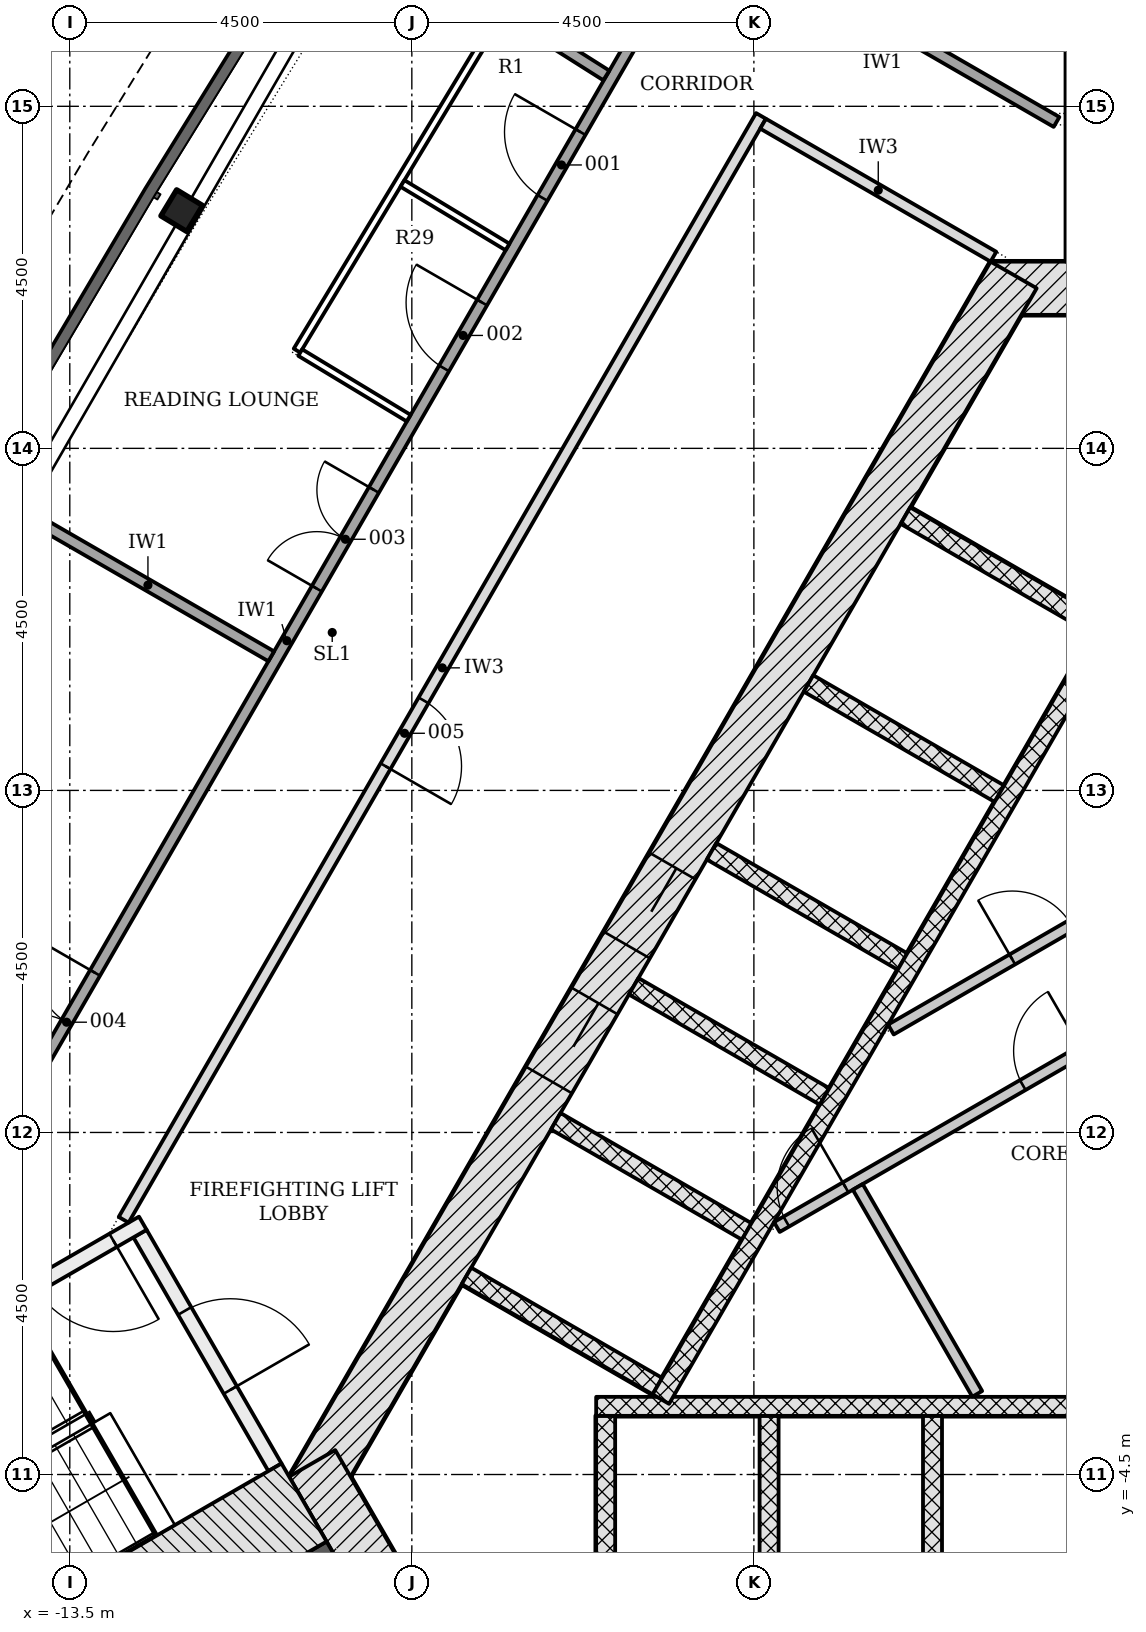
"""IFC4 building model, lengths in metres.
Left out: names, types, materials, properties, quantities, classifications, styles, units other than length and angle.
Written with IfcOpenShell. Run it as: python <this file> out.ifc"""

import sys

from ifc_helpers import new_model, si_unit, direction, frame, frame_2d, origin, origin_2d, place, context, subcontext, project, spatial, rectangle, i_section, extrude, element, fill, save


model = new_model("IFC4")
c1 = context("Model", 3, precision=1e-05, world=origin(), true_north=direction((0.0, 1.0)))
c2 = subcontext(c1, "Body", "Model", "MODEL_VIEW")
j1 = project(units=[si_unit("LENGTHUNIT", "METRE"), si_unit("PLANEANGLEUNIT", "RADIAN")], contexts=[c1])
p1 = place(None, origin())
s1 = spatial("IfcSite", under=j1, at=p1, CompositionType="ELEMENT")
p2 = place(p1, origin())
s2 = spatial("IfcBuilding", under=s1, at=p2, CompositionType="ELEMENT")
p3 = place(p2, frame((0.0, 0.0, 109.5)))
s3 = spatial("IfcBuildingStorey", under=s2, at=p3, CompositionType="ELEMENT", Elevation=109.5)
p4 = place(p3, frame((1.386, 11.106, -0.2), z_axis=(0.0, 0.0, 1.0), x_axis=(-1.0, 0.0, 0.0)))
e1 = element("IfcWall", 1, at=p4, inside=s3, PredefinedType="SHEAR", context=c2, shape_type="SweptSolid", body=[
    extrude(rectangle(XDim=2.771, YDim=0.7, at=frame_2d((1.386, 0.0))), origin(), (0.0, 0.0, 1.0), 3.6),
])
p5 = place(p3, frame((-1.083, 11.281, -0.2), z_axis=(0.0, 0.0, 1.0), x_axis=(-0.500001446645, -0.866024568562, 0.0)))
e2 = element("IfcWall", 2, at=p5, inside=s3, PredefinedType="SHEAR", context=c2, shape_type="SweptSolid", body=[
    extrude(rectangle(XDim=18.458, YDim=0.7, at=frame_2d((9.229, 0.0))), origin(), (0.0, 0.0, 1.0), 3.6),
])
p6 = place(p5, frame((8.979, 0.0, 0.2)))
e3 = element("IfcOpeningElement", 3, at=p6, cuts=e2, PredefinedType="OPENING", context=c2, shape_type="SweptSolid", body=[
    extrude(rectangle(XDim=1.2, YDim=2.1, at=frame_2d((0.6, 1.05))), frame((0.0, 0.36, 0.0), z_axis=(0.0, -1.0, 0.0), x_axis=(1.0, 0.0, 0.0)), (0.0, 0.0, 1.0), 0.72),
])
p7 = place(p5, frame((11.029, 0.0, 0.2)))
e4 = element("IfcOpeningElement", 4, at=p7, cuts=e2, PredefinedType="OPENING", context=c2, shape_type="SweptSolid", body=[
    extrude(rectangle(XDim=1.2, YDim=2.1, at=frame_2d((0.6, 1.05))), frame((0.0, 0.36, 0.0), z_axis=(0.0, -1.0, 0.0), x_axis=(1.0, 0.0, 0.0)), (0.0, 0.0, 1.0), 0.72),
])
p8 = place(p3, frame((-10.311, -4.353, -0.2), z_axis=(0.0, 0.0, 1.0), x_axis=(0.500042739161, -0.866000726912, 0.0)))
e5 = element("IfcWall", 5, at=p8, inside=s3, PredefinedType="SHEAR", context=c2, shape_type="SweptSolid", body=[
    extrude(rectangle(XDim=2.771, YDim=0.7, at=frame_2d((1.386, 0.0))), origin(), (0.0, 0.0, 1.0), 3.6),
])
p9 = place(p3, frame((0.0, 11.456, -0.2), z_axis=(0.0, 0.0, 1.0), x_axis=(0.0, 1.0, 0.0)))
e6 = element("IfcWall", 6, at=p9, inside=s3, PredefinedType="SHEAR", context=c2, shape_type="SweptSolid", body=[
    extrude(rectangle(XDim=11.919, YDim=0.8, at=frame_2d((5.959, 0.0))), origin(), (0.0, 0.0, 1.0), 3.6),
])
p10 = place(p3, frame((-9.922, -5.728, -0.2), z_axis=(0.0, 0.0, 1.0), x_axis=(-0.866027307971, -0.499996701837, 0.0)))
e7 = element("IfcWall", 7, at=p10, inside=s3, PredefinedType="SHEAR", context=c2, shape_type="SweptSolid", body=[
    extrude(rectangle(XDim=11.918, YDim=0.8, at=frame_2d((5.959, 0.0))), origin(), (0.0, 0.0, 1.0), 3.6),
])
p11 = place(p3, frame((-12.027, 12.127, -0.2), z_axis=(0.0, 0.0, 1.0), x_axis=(-0.517286763685, -0.855812131321, 0.0)))
e8 = element("IfcColumn", 8, at=p11, inside=s3, PredefinedType="COLUMN", context=c2, shape_type="SweptSolid", body=[
    extrude(i_section(OverallWidth=0.401, OverallDepth=0.399, WebThickness=0.025, FlangeThickness=0.04, FilletRadius=0.015, at=origin_2d()), origin(), (0.0, 0.0, 1.0), 3.6),
])
for number, where, z_axis, x_axis in (
    (9, (-6.45, -6.228, -0.2), (0.0, 0.0, 1.0), (0.0, 1.0, 0.0)),
    (10, (-4.3, -6.228, -0.2), (0.0, 0.0, 1.0), (0.0, 1.0, 0.0)),
    (11, (-2.15, -6.228, -0.2), (0.0, 0.0, 1.0), (0.0, 1.0, 0.0)),
):
    element("IfcWall", number, at=place(p3, frame(where, z_axis=z_axis, x_axis=x_axis)), inside=s3, PredefinedType="PARTITIONING", context=c2, shape_type="SweptSolid", body=[
        extrude(rectangle(XDim=2.5, YDim=0.25, at=frame_2d((1.25, 0.0))), origin(), (0.0, 0.0, 1.0), 3.6),
    ])
p12 = place(p3, frame((-6.575, -3.603, 0.0), z_axis=(0.0, 0.0, 1.0), x_axis=(1.0, 0.0, 0.0)))
e12 = element("IfcWall", 12, at=p12, inside=s3, PredefinedType="PARTITIONING", context=c2, shape_type="SweptSolid", body=[
    extrude(rectangle(XDim=13.15, YDim=0.25, at=frame_2d((6.575, 0.0))), origin(), (0.0, 0.0, 1.0), 3.4),
])
p13 = place(p3, frame((-2.506, 8.115, -0.2), z_axis=(0.0, 0.0, 1.0), x_axis=(0.865996321171, -0.50005036918, 0.0)))
e13 = element("IfcWall", 13, at=p13, inside=s3, PredefinedType="PARTITIONING", context=c2, shape_type="SweptSolid", body=[
    extrude(rectangle(XDim=2.9, YDim=0.25, at=frame_2d((1.45, 0.0))), origin(), (0.0, 0.0, 1.0), 3.6),
])
for number, where, z_axis, x_axis in (
    (14, (-3.781, 5.907, -0.2), (0.0, 0.0, 1.0), (0.866, -0.5, 0.0)),
    (15, (-5.056, 3.699, -0.2), (0.0, 0.0, 1.0), (0.866, -0.5, 0.0)),
    (16, (-6.081, 1.923, -0.2), (0.0, 0.0, 1.0), (0.866, -0.5, 0.0)),
    (17, (-7.106, 0.148, -0.2), (0.0, 0.0, 1.0), (0.866, -0.5, 0.0)),
    (18, (-8.281, -1.887, -0.2), (0.0, 0.0, 1.0), (0.866, -0.5, 0.0)),
):
    element("IfcWall", number, at=place(p3, frame(where, z_axis=z_axis, x_axis=x_axis)), inside=s3, PredefinedType="PARTITIONING", context=c2, shape_type="SweptSolid", body=[
        extrude(rectangle(XDim=2.9, YDim=0.25, at=frame_2d((1.45, 0.0))), origin(), (0.0, 0.0, 1.0), 3.6),
    ])
p14 = place(p3, frame((0.176, 6.711, 0.0), z_axis=(0.0, 0.0, 1.0), x_axis=(-0.500004227369, -0.866022963098, 0.0)))
e19 = element("IfcWall", 19, at=p14, inside=s3, PredefinedType="PARTITIONING", context=c2, shape_type="SweptSolid", body=[
    extrude(rectangle(XDim=11.8, YDim=0.25, at=frame_2d((5.9, 0.0))), origin(), (0.0, 0.0, 1.0), 3.4),
])
p15 = place(p3, frame((-4.198, -1.244, 0.0), z_axis=(0.0, 0.0, 1.0), x_axis=(0.866020798945, 0.500007975732, 0.0)))
e20 = element("IfcWall", 20, at=p15, inside=s3, PredefinedType="PARTITIONING", context=c2, shape_type="SweptSolid", body=[
    extrude(rectangle(XDim=10.486, YDim=0.15, at=frame_2d((5.243, 0.0))), origin(), (0.0, 0.0, 1.0), 3.4),
])
p16 = place(p15, frame((3.736, 0.0, 0.0)))
e21 = element("IfcOpeningElement", 21, at=p16, cuts=e20, PredefinedType="OPENING", context=c2, shape_type="SweptSolid", body=[
    extrude(rectangle(XDim=0.9, YDim=2.1, at=frame_2d((0.45, 1.05))), frame((0.0, 0.085, 0.0), z_axis=(0.0, -1.0, 0.0), x_axis=(1.0, 0.0, 0.0)), (0.0, 0.0, 1.0), 0.17),
])
p17 = place(p15, frame((0.144, 0.0, 0.0)))
e22 = element("IfcOpeningElement", 22, at=p17, cuts=e20, PredefinedType="OPENING", context=c2, shape_type="SweptSolid", body=[
    extrude(rectangle(XDim=0.9, YDim=2.1, at=frame_2d((0.45, 1.05))), frame((0.0, 0.085, 0.0), z_axis=(0.0, -1.0, 0.0), x_axis=(1.0, 0.0, 0.0)), (0.0, 0.0, 1.0), 0.17),
])
p18 = place(p3, frame((-1.561, -3.439, 0.0), z_axis=(0.0, 0.0, 1.0), x_axis=(-0.499989077369, 0.866031709877, 0.0)))
e23 = element("IfcWall", 23, at=p18, inside=s3, PredefinedType="PARTITIONING", context=c2, shape_type="SweptSolid", body=[
    extrude(rectangle(XDim=3.144, YDim=0.15, at=frame_2d((1.572, 0.0))), origin(), (0.0, 0.0, 1.0), 3.4),
])
p19 = place(p3, frame((-2.698, 1.354, 0.0), z_axis=(0.0, 0.0, 1.0), x_axis=(0.866021157486, 0.500007354732, 0.0)))
e24 = element("IfcWall", 24, at=p19, inside=s3, PredefinedType="PARTITIONING", context=c2, shape_type="SweptSolid", body=[
    extrude(rectangle(XDim=7.888, YDim=0.15, at=frame_2d((3.944, 0.0))), origin(), (0.0, 0.0, 1.0), 3.4),
])
p20 = place(p19, frame((1.845, 0.0, 0.0)))
e25 = element("IfcOpeningElement", 25, at=p20, cuts=e24, PredefinedType="OPENING", context=c2, shape_type="SweptSolid", body=[
    extrude(rectangle(XDim=0.9, YDim=2.1, at=frame_2d((0.45, 1.05))), frame((0.0, 0.085, 0.0), z_axis=(0.0, -1.0, 0.0), x_axis=(1.0, 0.0, 0.0)), (0.0, 0.0, 1.0), 0.17),
])
p21 = place(p3, frame((-12.576, -1.331, -0.2), z_axis=(0.0, 0.0, 1.0), x_axis=(0.499970499736, -0.8660424351, 0.0)))
e26 = element("IfcWall", 26, at=p21, inside=s3, PredefinedType="SHEAR", context=c2, shape_type="SweptSolid", body=[
    extrude(rectangle(XDim=3.55, YDim=0.2, at=frame_2d((1.775, 0.0))), origin(), (0.0, 0.0, 1.0), 3.6),
])
p22 = place(p21, frame((1.175, 0.0, 0.2)))
e27 = element("IfcOpeningElement", 27, at=p22, cuts=e26, PredefinedType="OPENING", context=c2, shape_type="SweptSolid", body=[
    extrude(rectangle(XDim=1.2, YDim=2.1, at=frame_2d((0.6, 1.05))), frame((0.0, 0.11, 0.0), z_axis=(0.0, -1.0, 0.0), x_axis=(1.0, 0.0, 0.0)), (0.0, 0.0, 1.0), 0.22),
])
p23 = place(p3, frame((-12.539, -1.194, -0.2), z_axis=(0.0, 0.0, 1.0), x_axis=(-0.866045472092, -0.499965239061, 0.0)))
e28 = element("IfcWall", 28, at=p23, inside=s3, PredefinedType="SHEAR", context=c2, shape_type="SweptSolid", body=[
    extrude(rectangle(XDim=5.6, YDim=0.2, at=frame_2d((2.8, 0.0))), origin(), (0.0, 0.0, 1.0), 3.6),
])
p24 = place(p23, frame((0.45, 0.0, 0.2)))
e29 = element("IfcOpeningElement", 29, at=p24, cuts=e28, PredefinedType="OPENING", context=c2, shape_type="SweptSolid", body=[
    extrude(rectangle(XDim=1.2, YDim=2.1, at=frame_2d((0.6, 1.05))), frame((0.0, 0.11, 0.0), z_axis=(0.0, -1.0, 0.0), x_axis=(1.0, 0.0, 0.0)), (0.0, 0.0, 1.0), 0.22),
])
p25 = place(p3, frame((-10.418, -4.868, -0.2), z_axis=(0.0, 0.0, 1.0), x_axis=(-0.866018442252, -0.500012057535, 0.0)))
e30 = element("IfcWall", 30, at=p25, inside=s3, PredefinedType="SHEAR", context=c2, shape_type="SweptSolid", body=[
    extrude(rectangle(XDim=7.2, YDim=1.186, at=frame_2d((3.6, 0.0))), origin(), (0.0, 0.0, 1.0), 3.6),
])
p26 = place(p3, frame((-16.169, -3.099, 0.0), z_axis=(0.0, 0.0, 1.0), x_axis=(0.499999805269, 0.866025516212, 0.0)))
e31 = element("IfcWall", 31, at=p26, inside=s3, PredefinedType="PARTITIONING", context=c2, shape_type="SweptSolid", body=[
    extrude(rectangle(XDim=22.097, YDim=0.15, at=frame_2d((11.049, 0.0))), origin(), (0.0, 0.0, 1.0), 2.847),
])
p27 = place(p26, frame((17.776, 0.0, 0.0)))
e32 = element("IfcOpeningElement", 32, at=p27, cuts=e31, PredefinedType="OPENING", context=c2, shape_type="SweptSolid", body=[
    extrude(rectangle(XDim=1.0, YDim=2.1, at=frame_2d((0.5, 1.05))), frame((0.0, 0.085, 0.0), z_axis=(0.0, -1.0, 0.0), x_axis=(1.0, 0.0, 0.0)), (0.0, 0.0, 1.0), 0.17),
])
p28 = place(p26, frame((15.186, 0.0, 0.0)))
e33 = element("IfcOpeningElement", 33, at=p28, cuts=e31, PredefinedType="OPENING", context=c2, shape_type="SweptSolid", body=[
    extrude(rectangle(XDim=1.0, YDim=2.1, at=frame_2d((0.5, 1.05))), frame((0.0, 0.085, 0.0), z_axis=(0.0, -1.0, 0.0), x_axis=(1.0, 0.0, 0.0)), (0.0, 0.0, 1.0), 0.17),
])
p29 = place(p26, frame((11.84, 0.0, 0.0)))
e34 = element("IfcOpeningElement", 34, at=p29, cuts=e31, PredefinedType="OPENING", context=c2, shape_type="SweptSolid", body=[
    extrude(rectangle(XDim=1.5, YDim=2.1, at=frame_2d((0.75, 1.05))), frame((0.0, 0.085, 0.0), z_axis=(0.0, -1.0, 0.0), x_axis=(1.0, 0.0, 0.0)), (0.0, 0.0, 1.0), 0.17),
])
p30 = place(p26, frame((4.503, 0.0, 0.0)))
e35 = element("IfcOpeningElement", 35, at=p30, cuts=e31, PredefinedType="OPENING", context=c2, shape_type="SweptSolid", body=[
    extrude(rectangle(XDim=1.5, YDim=2.1, at=frame_2d((0.75, 1.05))), frame((0.0, 0.085, 0.0), z_axis=(0.0, -1.0, 0.0), x_axis=(1.0, 0.0, 0.0)), (0.0, 0.0, 1.0), 0.17),
])
p31 = place(p3, frame((-4.407, 13.374, 0.0), z_axis=(0.0, 0.0, 1.0), x_axis=(-0.499997181693, -0.866027030928, 0.0)))
e36 = element("IfcWall", 36, at=p31, inside=s3, PredefinedType="PARTITIONING", context=c2, shape_type="SweptSolid", body=[
    extrude(rectangle(XDim=16.77, YDim=0.15, at=frame_2d((8.385, 0.0))), origin(), (0.0, 0.0, 1.0), 2.847),
])
p32 = place(p31, frame((8.879, 0.0, 0.0)))
e37 = element("IfcOpeningElement", 37, at=p32, cuts=e36, PredefinedType="OPENING", context=c2, shape_type="SweptSolid", body=[
    extrude(rectangle(XDim=1.0, YDim=2.1, at=frame_2d((0.5, 1.05))), frame((0.0, 0.085, 0.0), z_axis=(0.0, -1.0, 0.0), x_axis=(1.0, 0.0, 0.0)), (0.0, 0.0, 1.0), 0.17),
])
p33 = place(p3, frame((-5.093, 15.935, 0.0), z_axis=(0.0, 0.0, 1.0), x_axis=(0.866033195618, -0.499986503906, 0.0)))
e38 = element("IfcWall", 38, at=p33, inside=s3, PredefinedType="PARTITIONING", context=c2, shape_type="SweptSolid", body=[
    extrude(rectangle(XDim=5.282, YDim=0.15, at=frame_2d((2.641, 0.0))), origin(), (0.0, 0.0, 1.0), 3.4),
])
p34 = place(p33, frame((1.816, 0.0, 0.0)))
e39 = element("IfcOpeningElement", 39, at=p34, cuts=e38, PredefinedType="OPENING", context=c2, shape_type="SweptSolid", body=[
    extrude(rectangle(XDim=1.5, YDim=2.1, at=frame_2d((0.75, 1.05))), frame((0.0, 0.085, 0.0), z_axis=(0.0, -1.0, 0.0), x_axis=(1.0, 0.0, 0.0)), (0.0, 0.0, 1.0), 0.17),
])
p35 = place(p3, frame((-4.379, 13.271, 0.0), z_axis=(0.0, 0.0, 1.0), x_axis=(0.866019471182, -0.500010275428, 0.0)))
e40 = element("IfcWall", 40, at=p35, inside=s3, PredefinedType="PARTITIONING", context=c2, shape_type="SweptSolid", body=[
    extrude(rectangle(XDim=3.5, YDim=0.15, at=frame_2d((1.75, 0.0))), origin(), (0.0, 0.0, 1.0), 3.4),
])
p36 = place(p3, frame((-14.094, 8.137, 0.0), z_axis=(0.0, 0.0, 1.0), x_axis=(0.866036909293, -0.499980071345, 0.0)))
e41 = element("IfcWall", 41, at=p36, inside=s3, PredefinedType="PARTITIONING", context=c2, shape_type="SweptSolid", body=[
    extrude(rectangle(XDim=3.746, YDim=0.15, at=frame_2d((1.873, 0.0))), origin(), (0.0, 0.0, 1.0), 2.847),
])
p37 = place(p3, frame((-9.455, 15.812, 0.0), z_axis=(0.0, 0.0, 1.0), x_axis=(0.845256180865, -0.53436129043, 0.0)))
e42 = element("IfcWall", 42, at=p37, inside=s3, PredefinedType="PARTITIONING", context=c2, shape_type="SweptSolid", body=[
    extrude(rectangle(XDim=3.566, YDim=0.15, at=frame_2d((1.783, 0.0))), origin(), (0.0, 0.0, 1.0), 2.847),
])
p38 = place(p3, frame((-7.842, 14.702, 0.0), z_axis=(0.0, 0.0, 1.0), x_axis=(-0.517269453202, -0.855822594224, 0.0)))
e43 = element("IfcWall", 43, at=p38, inside=s3, PredefinedType="PARTITIONING", context=c2, shape_type="SweptSolid", body=[
    extrude(rectangle(XDim=5.16, YDim=0.1, at=frame_2d((2.58, 0.0))), origin(), (0.0, 0.0, 1.0), 2.847),
])
p39 = place(p3, frame((-10.468, 10.26, 0.0), z_axis=(0.0, 0.0, 1.0), x_axis=(0.855795319679, -0.517314576264, 0.0)))
e44 = element("IfcWall", 44, at=p39, inside=s3, PredefinedType="PARTITIONING", context=c2, shape_type="SweptSolid", body=[
    extrude(rectangle(XDim=1.667, YDim=0.1, at=frame_2d((0.833, 0.0))), origin(), (0.0, 0.0, 1.0), 3.4),
])
p40 = place(p3, frame((-9.123, 12.485, 0.0), z_axis=(0.0, 0.0, 1.0), x_axis=(0.855820717892, -0.517272557581, 0.0)))
e45 = element("IfcWall", 45, at=p40, inside=s3, PredefinedType="PARTITIONING", context=c2, shape_type="SweptSolid", body=[
    extrude(rectangle(XDim=1.615, YDim=0.1, at=frame_2d((0.807, 0.0))), origin(), (0.0, 0.0, 1.0), 3.4),
])
p41 = place(p6, origin())
e46 = element("IfcDoor", 46, at=p41, inside=s3, OperationType="DOUBLE_DOOR_SLIDING", PredefinedType="DOOR", context=c2, shape_type="SweptSolid", body=[
    extrude(rectangle(XDim=1.2, YDim=2.1, at=frame_2d((0.6, 1.05))), frame((0.0, 0.025, 0.0), z_axis=(0.0, -1.0, 0.0), x_axis=(1.0, 0.0, 0.0)), (0.0, 0.0, 1.0), 0.05),
])
fill(e3, e46)
p42 = place(p7, origin())
e47 = element("IfcDoor", 47, at=p42, inside=s3, OperationType="DOUBLE_DOOR_SLIDING", PredefinedType="DOOR", context=c2, shape_type="SweptSolid", body=[
    extrude(rectangle(XDim=1.2, YDim=2.1, at=frame_2d((0.6, 1.05))), frame((0.0, 0.025, 0.0), z_axis=(0.0, -1.0, 0.0), x_axis=(1.0, 0.0, 0.0)), (0.0, 0.0, 1.0), 0.05),
])
fill(e4, e47)
p43 = place(p16, origin())
e48 = element("IfcDoor", 48, at=p43, inside=s3, OperationType="SINGLE_SWING_RIGHT", PredefinedType="DOOR", context=c2, shape_type="SweptSolid", body=[
    extrude(rectangle(XDim=0.9, YDim=2.1, at=frame_2d((0.45, 1.05))), frame((0.0, 0.025, 0.0), z_axis=(0.0, -1.0, 0.0), x_axis=(1.0, 0.0, 0.0)), (0.0, 0.0, 1.0), 0.05),
])
fill(e21, e48)
p44 = place(p20, origin())
e49 = element("IfcDoor", 49, at=p44, inside=s3, OperationType="SINGLE_SWING_LEFT", PredefinedType="DOOR", context=c2, shape_type="SweptSolid", body=[
    extrude(rectangle(XDim=0.9, YDim=2.1, at=frame_2d((0.45, 1.05))), frame((0.0, 0.025, 0.0), z_axis=(0.0, -1.0, 0.0), x_axis=(1.0, 0.0, 0.0)), (0.0, 0.0, 1.0), 0.05),
])
fill(e25, e49)
p45 = place(p17, origin())
e50 = element("IfcDoor", 50, at=p45, inside=s3, OperationType="SINGLE_SWING_RIGHT", PredefinedType="DOOR", context=c2, shape_type="SweptSolid", body=[
    extrude(rectangle(XDim=0.9, YDim=2.1, at=frame_2d((0.45, 1.05))), frame((0.0, 0.025, 0.0), z_axis=(0.0, -1.0, 0.0), x_axis=(1.0, 0.0, 0.0)), (0.0, 0.0, 1.0), 0.05),
])
fill(e22, e50)
p46 = place(p22, origin())
e51 = element("IfcDoor", 51, at=p46, inside=s3, OperationType="SINGLE_SWING_RIGHT", PredefinedType="DOOR", context=c2, shape_type="SweptSolid", body=[
    extrude(rectangle(XDim=1.2, YDim=2.1, at=frame_2d((0.6, 1.05))), frame((0.0, 0.025, 0.0), z_axis=(0.0, -1.0, 0.0), x_axis=(1.0, 0.0, 0.0)), (0.0, 0.0, 1.0), 0.05),
])
fill(e27, e51)
p47 = place(p24, origin())
e52 = element("IfcDoor", 52, at=p47, inside=s3, OperationType="SINGLE_SWING_LEFT", PredefinedType="DOOR", context=c2, shape_type="SweptSolid", body=[
    extrude(rectangle(XDim=1.2, YDim=2.1, at=frame_2d((0.6, 1.05))), frame((0.0, 0.025, 0.0), z_axis=(0.0, -1.0, 0.0), x_axis=(1.0, 0.0, 0.0)), (0.0, 0.0, 1.0), 0.05),
])
fill(e29, e52)
p48 = place(p27, origin())
e53 = element("IfcDoor", 53, at=p48, inside=s3, OperationType="SINGLE_SWING_RIGHT", PredefinedType="DOOR", context=c2, shape_type="SweptSolid", body=[
    extrude(rectangle(XDim=1.0, YDim=2.1, at=frame_2d((0.5, 1.05))), frame((0.0, 0.025, 0.0), z_axis=(0.0, -1.0, 0.0), x_axis=(1.0, 0.0, 0.0)), (0.0, 0.0, 1.0), 0.05),
])
fill(e32, e53)
p49 = place(p28, origin())
e54 = element("IfcDoor", 54, at=p49, inside=s3, OperationType="SINGLE_SWING_RIGHT", PredefinedType="DOOR", context=c2, shape_type="SweptSolid", body=[
    extrude(rectangle(XDim=1.0, YDim=2.1, at=frame_2d((0.5, 1.05))), frame((0.0, 0.025, 0.0), z_axis=(0.0, -1.0, 0.0), x_axis=(1.0, 0.0, 0.0)), (0.0, 0.0, 1.0), 0.05),
])
fill(e33, e54)
p50 = place(p29, origin())
e55 = element("IfcDoor", 55, at=p50, inside=s3, OperationType="DOUBLE_DOOR_SINGLE_SWING", PredefinedType="DOOR", context=c2, shape_type="SweptSolid", body=[
    extrude(rectangle(XDim=1.5, YDim=2.1, at=frame_2d((0.75, 1.05))), frame((0.0, 0.025, 0.0), z_axis=(0.0, -1.0, 0.0), x_axis=(1.0, 0.0, 0.0)), (0.0, 0.0, 1.0), 0.05),
])
fill(e34, e55)
p51 = place(p30, origin())
e56 = element("IfcDoor", 56, at=p51, inside=s3, OperationType="DOUBLE_DOOR_SINGLE_SWING", PredefinedType="DOOR", context=c2, shape_type="SweptSolid", body=[
    extrude(rectangle(XDim=1.5, YDim=2.1, at=frame_2d((0.75, 1.05))), frame((0.0, 0.025, 0.0), z_axis=(0.0, -1.0, 0.0), x_axis=(1.0, 0.0, 0.0)), (0.0, 0.0, 1.0), 0.05),
])
fill(e35, e56)
p52 = place(p32, origin())
e57 = element("IfcDoor", 57, at=p52, inside=s3, OperationType="SINGLE_SWING_RIGHT", PredefinedType="DOOR", context=c2, shape_type="SweptSolid", body=[
    extrude(rectangle(XDim=1.0, YDim=2.1, at=frame_2d((0.5, 1.05))), frame((0.0, 0.025, 0.0), z_axis=(0.0, -1.0, 0.0), x_axis=(1.0, 0.0, 0.0)), (0.0, 0.0, 1.0), 0.05),
])
fill(e37, e57)
save(model, sys.argv[1])
